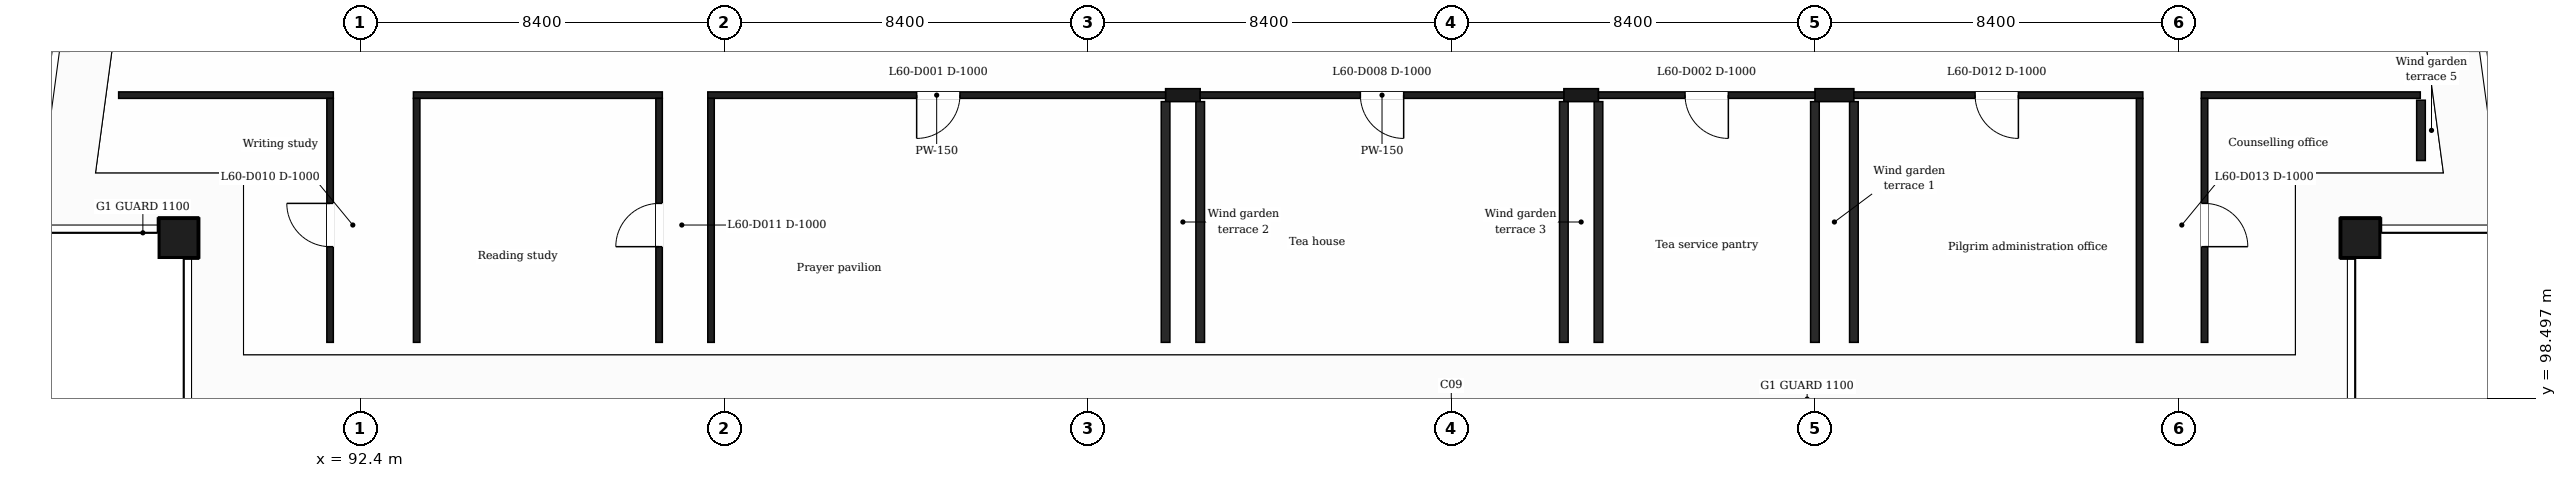
"""IFC4 building model, lengths in metres.
Left out: names, types, materials, properties, quantities, classifications, styles, units other than length and angle.
Written with IfcOpenShell. Run it as: python <this file> out.ifc"""

import sys

from ifc_helpers import new_model, si_unit, direction, frame, frame_2d, origin, origin_2d, place, context, subcontext, project, spatial, rectangle, extrude, element, fill, save


model = new_model("IFC4")
c1 = context("Model", 3, precision=1e-05, world=origin(), true_north=direction((0.0, 1.0)))
c2 = subcontext(c1, "Body", "Model", "MODEL_VIEW")
j1 = project(units=[si_unit("LENGTHUNIT", "METRE"), si_unit("PLANEANGLEUNIT", "RADIAN")], contexts=[c1])
p1 = place(None, origin())
s1 = spatial("IfcSite", under=j1, at=p1, CompositionType="ELEMENT")
p2 = place(p1, origin())
s2 = spatial("IfcBuilding", under=s1, at=p2, CompositionType="ELEMENT")
p3 = place(p2, frame((0.0, 0.0, 246.6)))
s3 = spatial("IfcBuildingStorey", under=s2, at=p3, CompositionType="ELEMENT", Elevation=246.6)
for number, where, z_axis, x_axis in (
    (1, (88.2, 102.2, 0.0), (0.0, 0.0, 1.0), (1.0, 0.0, 0.0)),
    (2, (138.6, 102.2, 0.0), (0.0, 0.0, 1.0), (1.0, 0.0, 0.0)),
):
    element("IfcColumn", number, at=place(p3, frame(where, z_axis=z_axis, x_axis=x_axis)), inside=s3, PredefinedType="COLUMN", context=c2, shape_type="SweptSolid", body=[
        extrude(rectangle(XDim=0.9, YDim=0.9, at=origin_2d()), origin(), (0.0, 0.0, 1.0), 7.4),
    ])
for number, where, z_axis, x_axis in (
    (3, (111.0, 105.5, 0.0), (0.0, 0.0, 1.0), (1.0, 0.0, 0.0)),
    (4, (120.2, 105.5, 0.0), (0.0, 0.0, 1.0), (1.0, 0.0, 0.0)),
):
    element("IfcWall", number, at=place(p3, frame(where, z_axis=z_axis, x_axis=x_axis)), inside=s3, PredefinedType="PARTITIONING", context=c2, shape_type="SweptSolid", body=[
        extrude(rectangle(XDim=0.8, YDim=0.3, at=frame_2d((0.4, 0.0))), origin(), (0.0, 0.0, 1.0), 1.0),
    ])
p4 = place(p3, frame((126.0, 105.5, 0.0), z_axis=(0.0, 0.0, 1.0), x_axis=(1.0, 0.0, 0.0)))
e5 = element("IfcWall", 5, at=p4, inside=s3, PredefinedType="PARTITIONING", context=c2, shape_type="SweptSolid", body=[
    extrude(rectangle(XDim=0.9, YDim=0.3, at=frame_2d((0.45, 0.0))), origin(), (0.0, 0.0, 1.0), 1.0),
])
p5 = place(p3, frame((86.816, 105.5, 0.0), z_axis=(0.0, 0.0, 1.0), x_axis=(1.0, 0.0, 0.0)))
e6 = element("IfcWall", 6, at=p5, inside=s3, PredefinedType="PARTITIONING", context=c2, shape_type="SweptSolid", body=[
    extrude(rectangle(XDim=4.959, YDim=0.15, at=frame_2d((2.479, 0.0))), origin(), (0.0, 0.0, 1.0), 6.9),
])
p6 = place(p3, frame((93.625, 105.5, 0.0), z_axis=(0.0, 0.0, 1.0), x_axis=(1.0, 0.0, 0.0)))
e7 = element("IfcWall", 7, at=p6, inside=s3, PredefinedType="PARTITIONING", context=c2, shape_type="SweptSolid", body=[
    extrude(rectangle(XDim=5.75, YDim=0.15, at=frame_2d((2.875, 0.0))), origin(), (0.0, 0.0, 1.0), 6.9),
])
p7 = place(p3, frame((100.425, 105.5, 0.0), z_axis=(0.0, 0.0, 1.0), x_axis=(1.0, 0.0, 0.0)))
e8 = element("IfcWall", 8, at=p7, inside=s3, PredefinedType="PARTITIONING", context=c2, shape_type="SweptSolid", body=[
    extrude(rectangle(XDim=10.575, YDim=0.15, at=frame_2d((5.288, 0.0))), origin(), (0.0, 0.0, 1.0), 6.9),
])
p8 = place(p7, frame((4.825, 0.0, 0.0)))
e9 = element("IfcOpeningElement", 9, at=p8, cuts=e8, PredefinedType="OPENING", context=c2, shape_type="SweptSolid", body=[
    extrude(rectangle(XDim=1.0, YDim=2.1, at=frame_2d((0.5, 1.05))), frame((0.0, 0.085, 0.0), z_axis=(0.0, -1.0, 0.0), x_axis=(1.0, 0.0, 0.0)), (0.0, 0.0, 1.0), 0.17),
])
p9 = place(p3, frame((111.8, 105.5, 0.0), z_axis=(0.0, 0.0, 1.0), x_axis=(1.0, 0.0, 0.0)))
e10 = element("IfcWall", 10, at=p9, inside=s3, PredefinedType="PARTITIONING", context=c2, shape_type="SweptSolid", body=[
    extrude(rectangle(XDim=8.4, YDim=0.15, at=frame_2d((4.2, 0.0))), origin(), (0.0, 0.0, 1.0), 6.9),
])
p10 = place(p9, frame((3.7, 0.0, 0.0)))
e11 = element("IfcOpeningElement", 11, at=p10, cuts=e10, PredefinedType="OPENING", context=c2, shape_type="SweptSolid", body=[
    extrude(rectangle(XDim=1.0, YDim=2.1, at=frame_2d((0.5, 1.05))), frame((0.0, 0.085, 0.0), z_axis=(0.0, -1.0, 0.0), x_axis=(1.0, 0.0, 0.0)), (0.0, 0.0, 1.0), 0.17),
])
p11 = place(p3, frame((121.0, 105.5, 0.0), z_axis=(0.0, 0.0, 1.0), x_axis=(1.0, 0.0, 0.0)))
e12 = element("IfcWall", 12, at=p11, inside=s3, PredefinedType="PARTITIONING", context=c2, shape_type="SweptSolid", body=[
    extrude(rectangle(XDim=5.0, YDim=0.15, at=frame_2d((2.5, 0.0))), origin(), (0.0, 0.0, 1.0), 6.9),
])
p12 = place(p11, frame((2.0, 0.0, 0.0)))
e13 = element("IfcOpeningElement", 13, at=p12, cuts=e12, PredefinedType="OPENING", context=c2, shape_type="SweptSolid", body=[
    extrude(rectangle(XDim=1.0, YDim=2.1, at=frame_2d((0.5, 1.05))), frame((0.0, 0.085, 0.0), z_axis=(0.0, -1.0, 0.0), x_axis=(1.0, 0.0, 0.0)), (0.0, 0.0, 1.0), 0.17),
])
p13 = place(p3, frame((126.9, 105.5, 0.0), z_axis=(0.0, 0.0, 1.0), x_axis=(1.0, 0.0, 0.0)))
e14 = element("IfcWall", 14, at=p13, inside=s3, PredefinedType="PARTITIONING", context=c2, shape_type="SweptSolid", body=[
    extrude(rectangle(XDim=6.675, YDim=0.15, at=frame_2d((3.337, 0.0))), origin(), (0.0, 0.0, 1.0), 6.9),
])
p14 = place(p13, frame((2.8, 0.0, 0.0)))
e15 = element("IfcOpeningElement", 15, at=p14, cuts=e14, PredefinedType="OPENING", context=c2, shape_type="SweptSolid", body=[
    extrude(rectangle(XDim=1.0, YDim=2.1, at=frame_2d((0.5, 1.05))), frame((0.0, 0.085, 0.0), z_axis=(0.0, -1.0, 0.0), x_axis=(1.0, 0.0, 0.0)), (0.0, 0.0, 1.0), 0.17),
])
p15 = place(p3, frame((134.925, 105.5, 0.0), z_axis=(0.0, 0.0, 1.0), x_axis=(1.0, 0.0, 0.0)))
e16 = element("IfcWall", 16, at=p15, inside=s3, PredefinedType="PARTITIONING", context=c2, shape_type="SweptSolid", body=[
    extrude(rectangle(XDim=5.059, YDim=0.15, at=frame_2d((2.53, 0.0))), origin(), (0.0, 0.0, 1.0), 6.9),
])
p16 = place(p3, frame((91.7, 99.79, 0.0), z_axis=(0.0, 0.0, 1.0), x_axis=(0.0, 1.0, 0.0)))
e17 = element("IfcWall", 17, at=p16, inside=s3, PredefinedType="PARTITIONING", context=c2, shape_type="SweptSolid", body=[
    extrude(rectangle(XDim=5.635, YDim=0.15, at=frame_2d((2.817, 0.0))), origin(), (0.0, 0.0, 1.0), 6.9),
])
p17 = place(p16, frame((2.21, 0.0, 0.0)))
e18 = element("IfcOpeningElement", 18, at=p17, cuts=e17, PredefinedType="OPENING", context=c2, shape_type="SweptSolid", body=[
    extrude(rectangle(XDim=1.0, YDim=2.1, at=frame_2d((0.5, 1.05))), frame((0.0, 0.085, 0.0), z_axis=(0.0, -1.0, 0.0), x_axis=(1.0, 0.0, 0.0)), (0.0, 0.0, 1.0), 0.17),
])
p18 = place(p3, frame((93.7, 99.79, 0.0), z_axis=(0.0, 0.0, 1.0), x_axis=(0.0, 1.0, 0.0)))
e19 = element("IfcWall", 19, at=p18, inside=s3, PredefinedType="PARTITIONING", context=c2, shape_type="SweptSolid", body=[
    extrude(rectangle(XDim=5.635, YDim=0.15, at=frame_2d((2.817, 0.0))), origin(), (0.0, 0.0, 1.0), 6.9),
])
p19 = place(p3, frame((99.3, 99.79, 0.0), z_axis=(0.0, 0.0, 1.0), x_axis=(0.0, 1.0, 0.0)))
e20 = element("IfcWall", 20, at=p19, inside=s3, PredefinedType="PARTITIONING", context=c2, shape_type="SweptSolid", body=[
    extrude(rectangle(XDim=5.635, YDim=0.15, at=frame_2d((2.817, 0.0))), origin(), (0.0, 0.0, 1.0), 6.9),
])
p20 = place(p19, frame((2.21, 0.0, 0.0)))
e21 = element("IfcOpeningElement", 21, at=p20, cuts=e20, PredefinedType="OPENING", context=c2, shape_type="SweptSolid", body=[
    extrude(rectangle(XDim=1.0, YDim=2.1, at=frame_2d((0.5, 1.05))), frame((0.0, 0.085, 0.0), z_axis=(0.0, -1.0, 0.0), x_axis=(1.0, 0.0, 0.0)), (0.0, 0.0, 1.0), 0.17),
])
p21 = place(p3, frame((100.5, 99.79, 0.0), z_axis=(0.0, 0.0, 1.0), x_axis=(0.0, 1.0, 0.0)))
e22 = element("IfcWall", 22, at=p21, inside=s3, PredefinedType="PARTITIONING", context=c2, shape_type="SweptSolid", body=[
    extrude(rectangle(XDim=5.635, YDim=0.15, at=frame_2d((2.817, 0.0))), origin(), (0.0, 0.0, 1.0), 6.9),
])
for number, where, z_axis, x_axis in (
    (23, (111.0, 99.79, 0.0), (0.0, 0.0, 1.0), (0.0, 1.0, 0.0)),
    (24, (111.8, 99.79, 0.0), (0.0, 0.0, 1.0), (0.0, 1.0, 0.0)),
    (25, (120.2, 99.79, 0.0), (0.0, 0.0, 1.0), (0.0, 1.0, 0.0)),
    (26, (121.0, 99.79, 0.0), (0.0, 0.0, 1.0), (0.0, 1.0, 0.0)),
    (27, (126.0, 99.79, 0.0), (0.0, 0.0, 1.0), (0.0, 1.0, 0.0)),
    (28, (126.9, 99.79, 0.0), (0.0, 0.0, 1.0), (0.0, 1.0, 0.0)),
):
    element("IfcWall", number, at=place(p3, frame(where, z_axis=z_axis, x_axis=x_axis)), inside=s3, PredefinedType="PARTITIONING", context=c2, shape_type="SweptSolid", body=[
        extrude(rectangle(XDim=5.56, YDim=0.2, at=frame_2d((2.78, 0.0))), origin(), (0.0, 0.0, 1.0), 6.9),
    ])
p22 = place(p3, frame((133.5, 99.79, 0.0), z_axis=(0.0, 0.0, 1.0), x_axis=(0.0, 1.0, 0.0)))
e29 = element("IfcWall", 29, at=p22, inside=s3, PredefinedType="PARTITIONING", context=c2, shape_type="SweptSolid", body=[
    extrude(rectangle(XDim=5.635, YDim=0.15, at=frame_2d((2.817, 0.0))), origin(), (0.0, 0.0, 1.0), 6.9),
])
p23 = place(p3, frame((135.0, 99.79, 0.0), z_axis=(0.0, 0.0, 1.0), x_axis=(0.0, 1.0, 0.0)))
e30 = element("IfcWall", 30, at=p23, inside=s3, PredefinedType="PARTITIONING", context=c2, shape_type="SweptSolid", body=[
    extrude(rectangle(XDim=5.635, YDim=0.15, at=frame_2d((2.817, 0.0))), origin(), (0.0, 0.0, 1.0), 6.9),
])
p24 = place(p23, frame((2.21, 0.0, 0.0)))
e31 = element("IfcOpeningElement", 31, at=p24, cuts=e30, PredefinedType="OPENING", context=c2, shape_type="SweptSolid", body=[
    extrude(rectangle(XDim=1.0, YDim=2.1, at=frame_2d((0.5, 1.05))), frame((0.0, 0.085, 0.0), z_axis=(0.0, -1.0, 0.0), x_axis=(1.0, 0.0, 0.0)), (0.0, 0.0, 1.0), 0.17),
])
p25 = place(p3, frame((140.0, 103.99, 0.0), z_axis=(0.0, 0.0, 1.0), x_axis=(0.0, 1.0, 0.0)))
e32 = element("IfcWall", 32, at=p25, inside=s3, PredefinedType="PARTITIONING", context=c2, shape_type="SweptSolid", body=[
    extrude(rectangle(XDim=1.393, YDim=0.2, at=frame_2d((0.696, 0.0))), origin(), (0.0, 0.0, 1.0), 6.9),
])
p26 = place(p8, origin())
e33 = element("IfcDoor", 33, at=p26, inside=s3, OperationType="SINGLE_SWING_LEFT", PredefinedType="DOOR", context=c2, shape_type="SweptSolid", body=[
    extrude(rectangle(XDim=1.0, YDim=2.1, at=frame_2d((0.5, 1.05))), frame((0.0, 0.025, 0.0), z_axis=(0.0, -1.0, 0.0), x_axis=(1.0, 0.0, 0.0)), (0.0, 0.0, 1.0), 0.05),
])
fill(e9, e33)
p27 = place(p12, origin())
e34 = element("IfcDoor", 34, at=p27, inside=s3, OperationType="SINGLE_SWING_RIGHT", PredefinedType="DOOR", context=c2, shape_type="SweptSolid", body=[
    extrude(rectangle(XDim=1.0, YDim=2.1, at=frame_2d((0.5, 1.05))), frame((0.0, 0.025, 0.0), z_axis=(0.0, -1.0, 0.0), x_axis=(1.0, 0.0, 0.0)), (0.0, 0.0, 1.0), 0.05),
])
fill(e13, e34)
p28 = place(p10, origin())
e35 = element("IfcDoor", 35, at=p28, inside=s3, OperationType="SINGLE_SWING_RIGHT", PredefinedType="DOOR", context=c2, shape_type="SweptSolid", body=[
    extrude(rectangle(XDim=1.0, YDim=2.1, at=frame_2d((0.5, 1.05))), frame((0.0, 0.025, 0.0), z_axis=(0.0, -1.0, 0.0), x_axis=(1.0, 0.0, 0.0)), (0.0, 0.0, 1.0), 0.05),
])
fill(e11, e35)
p29 = place(p17, origin())
e36 = element("IfcDoor", 36, at=p29, inside=s3, OperationType="SINGLE_SWING_RIGHT", PredefinedType="DOOR", context=c2, shape_type="SweptSolid", body=[
    extrude(rectangle(XDim=1.0, YDim=2.1, at=frame_2d((0.5, 1.05))), frame((0.0, 0.025, 0.0), z_axis=(0.0, -1.0, 0.0), x_axis=(1.0, 0.0, 0.0)), (0.0, 0.0, 1.0), 0.05),
])
fill(e18, e36)
p30 = place(p20, origin())
e37 = element("IfcDoor", 37, at=p30, inside=s3, OperationType="SINGLE_SWING_LEFT", PredefinedType="DOOR", context=c2, shape_type="SweptSolid", body=[
    extrude(rectangle(XDim=1.0, YDim=2.1, at=frame_2d((0.5, 1.05))), frame((0.0, 0.025, 0.0), z_axis=(0.0, -1.0, 0.0), x_axis=(1.0, 0.0, 0.0)), (0.0, 0.0, 1.0), 0.05),
])
fill(e21, e37)
p31 = place(p14, origin())
e38 = element("IfcDoor", 38, at=p31, inside=s3, OperationType="SINGLE_SWING_RIGHT", PredefinedType="DOOR", context=c2, shape_type="SweptSolid", body=[
    extrude(rectangle(XDim=1.0, YDim=2.1, at=frame_2d((0.5, 1.05))), frame((0.0, 0.025, 0.0), z_axis=(0.0, -1.0, 0.0), x_axis=(1.0, 0.0, 0.0)), (0.0, 0.0, 1.0), 0.05),
])
fill(e15, e38)
p32 = place(p24, origin())
e39 = element("IfcDoor", 39, at=p32, inside=s3, OperationType="SINGLE_SWING_LEFT", PredefinedType="DOOR", context=c2, shape_type="SweptSolid", body=[
    extrude(rectangle(XDim=1.0, YDim=2.1, at=frame_2d((0.5, 1.05))), frame((0.0, 0.025, 0.0), z_axis=(0.0, -1.0, 0.0), x_axis=(1.0, 0.0, 0.0)), (0.0, 0.0, 1.0), 0.05),
])
fill(e31, e39)
save(model, sys.argv[1])
